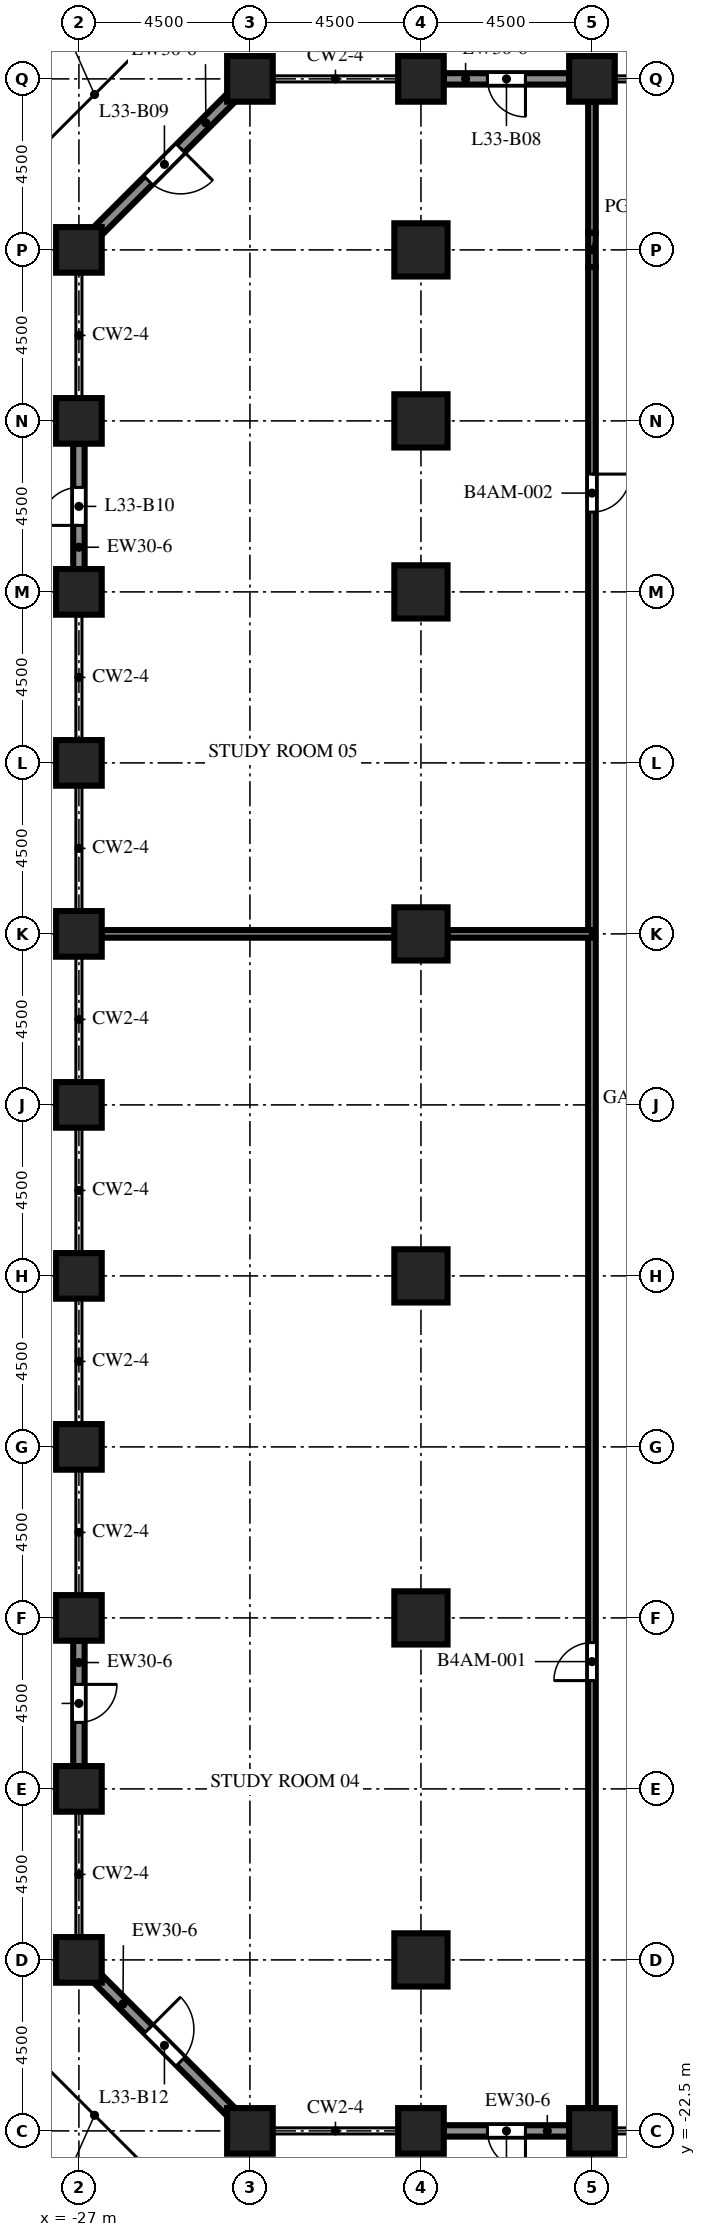
"""IFC4 building model, lengths in metres.
Left out: names, types, materials, properties, quantities, classifications, styles, units other than length and angle.
Written with IfcOpenShell. Run it as: python <this file> out.ifc"""

import sys

from ifc_helpers import new_model, si_unit, direction, frame, frame_2d, origin, origin_2d, place, context, subcontext, project, spatial, rectangle, extrude, element, fill, save


model = new_model("IFC4")
c1 = context("Model", 3, precision=1e-05, world=origin(), true_north=direction((0.0, 1.0)))
c2 = subcontext(c1, "Body", "Model", "MODEL_VIEW")
j1 = project(units=[si_unit("LENGTHUNIT", "METRE"), si_unit("PLANEANGLEUNIT", "RADIAN")], contexts=[c1])
p1 = place(None, origin())
s1 = spatial("IfcSite", under=j1, at=p1, CompositionType="ELEMENT")
p2 = place(p1, origin())
s2 = spatial("IfcBuilding", under=s1, at=p2, CompositionType="ELEMENT")
p3 = place(p2, frame((0.0, 0.0, 145.4)))
s3 = spatial("IfcBuildingStorey", under=s2, at=p3, CompositionType="ELEMENT", Elevation=145.4)
for number, where, z_axis, x_axis in (
    (1, (-27.0, -18.0, 0.0), (0.0, 0.0, 1.0), (1.0, 0.0, 0.0)),
    (2, (-27.0, -13.5, 0.0), (0.0, 0.0, 1.0), (1.0, 0.0, 0.0)),
    (3, (-27.0, -9.0, 0.0), (0.0, 0.0, 1.0), (1.0, 0.0, 0.0)),
    (4, (-27.0, -4.5, 0.0), (0.0, 0.0, 1.0), (1.0, 0.0, 0.0)),
    (5, (-27.0, 0.0, 0.0), (0.0, 0.0, 1.0), (1.0, 0.0, 0.0)),
    (6, (-27.0, 4.5, 0.0), (0.0, 0.0, 1.0), (1.0, 0.0, 0.0)),
    (7, (-27.0, 9.0, 0.0), (0.0, 0.0, 1.0), (1.0, 0.0, 0.0)),
    (8, (-27.0, 13.5, 0.0), (0.0, 0.0, 1.0), (1.0, 0.0, 0.0)),
    (9, (-27.0, 18.0, 0.0), (0.0, 0.0, 1.0), (1.0, 0.0, 0.0)),
    (10, (-27.0, 22.5, 0.0), (0.0, 0.0, 1.0), (1.0, 0.0, 0.0)),
):
    element("IfcColumn", number, at=place(p3, frame(where, z_axis=z_axis, x_axis=x_axis)), inside=s3, PredefinedType="COLUMN", context=c2, shape_type="SweptSolid", body=[
        extrude(rectangle(XDim=1.2, YDim=1.2, at=origin_2d()), origin(), (0.0, 0.0, 1.0), 6.0),
    ])
p4 = place(p3, frame((-27.0, 27.0, 0.0), z_axis=(0.0, 0.0, 1.0), x_axis=(1.0, 0.0, 0.0)))
e11 = element("IfcColumn", 11, at=p4, inside=s3, PredefinedType="COLUMN", context=c2, shape_type="SweptSolid", body=[
    extrude(rectangle(XDim=1.2, YDim=1.2, at=origin_2d()), origin(), (0.0, 0.0, 1.0), 3.6),
])
for number, where, z_axis, x_axis in (
    (12, (-22.5, -22.5, 0.0), (0.0, 0.0, 1.0), (1.0, 0.0, 0.0)),
    (13, (-22.5, 31.5, 0.0), (0.0, 0.0, 1.0), (1.0, 0.0, 0.0)),
    (14, (-18.0, -22.5, 0.0), (0.0, 0.0, 1.0), (1.0, 0.0, 0.0)),
    (15, (-18.0, 31.5, 0.0), (0.0, 0.0, 1.0), (1.0, 0.0, 0.0)),
    (16, (-13.5, -22.5, 0.0), (0.0, 0.0, 1.0), (1.0, 0.0, 0.0)),
    (17, (-13.5, 31.5, 0.0), (0.0, 0.0, 1.0), (1.0, 0.0, 0.0)),
):
    element("IfcColumn", number, at=place(p3, frame(where, z_axis=z_axis, x_axis=x_axis)), inside=s3, PredefinedType="COLUMN", context=c2, shape_type="SweptSolid", body=[
        extrude(rectangle(XDim=1.2, YDim=1.2, at=origin_2d()), origin(), (0.0, 0.0, 1.0), 6.0),
    ])
for number, where, z_axis, x_axis in (
    (18, (-18.0, -18.0, 0.0), (0.0, 0.0, 1.0), (1.0, 0.0, 0.0)),
    (19, (-18.0, -9.0, 0.0), (0.0, 0.0, 1.0), (1.0, 0.0, 0.0)),
    (20, (-18.0, 0.0, 0.0), (0.0, 0.0, 1.0), (1.0, 0.0, 0.0)),
    (21, (-18.0, 9.0, 0.0), (0.0, 0.0, 1.0), (1.0, 0.0, 0.0)),
    (22, (-18.0, 18.0, 0.0), (0.0, 0.0, 1.0), (1.0, 0.0, 0.0)),
    (23, (-18.0, 22.5, 0.0), (0.0, 0.0, 1.0), (1.0, 0.0, 0.0)),
):
    element("IfcColumn", number, at=place(p3, frame(where, z_axis=z_axis, x_axis=x_axis)), inside=s3, PredefinedType="COLUMN", context=c2, shape_type="SweptSolid", body=[
        extrude(rectangle(XDim=1.4, YDim=1.4, at=origin_2d()), origin(), (0.0, 0.0, 1.0), 6.0),
    ])
p5 = place(p3, frame((-18.0, 27.0, 0.0), z_axis=(0.0, 0.0, 1.0), x_axis=(1.0, 0.0, 0.0)))
e24 = element("IfcColumn", 24, at=p5, inside=s3, PredefinedType="COLUMN", context=c2, shape_type="SweptSolid", body=[
    extrude(rectangle(XDim=1.4, YDim=1.4, at=origin_2d()), origin(), (0.0, 0.0, 1.0), 5.4),
])
p6 = place(p3, frame((-14.1, -22.5, 0.0), z_axis=(0.0, 0.0, 1.0), x_axis=(-1.0, 0.0, 0.0)))
e25 = element("IfcWall", 25, at=p6, inside=s3, PredefinedType="SOLIDWALL", context=c2, shape_type="SweptSolid", body=[
    extrude(rectangle(XDim=3.3, YDim=0.3, at=frame_2d((1.65, 0.0))), origin(), (0.0, 0.0, 1.0), 4.5),
])
p7 = place(p6, frame((1.15, 0.0, 0.0)))
e26 = element("IfcOpeningElement", 26, at=p7, cuts=e25, PredefinedType="OPENING", context=c2, shape_type="SweptSolid", body=[
    extrude(rectangle(XDim=1.0, YDim=2.2, at=frame_2d((0.5, 1.1))), frame((0.0, 0.16, 0.0), z_axis=(0.0, -1.0, 0.0), x_axis=(1.0, 0.0, 0.0)), (0.0, 0.0, 1.0), 0.32),
])
p8 = place(p3, frame((-17.4, 31.5, 0.0), z_axis=(0.0, 0.0, 1.0), x_axis=(1.0, 0.0, 0.0)))
e27 = element("IfcWall", 27, at=p8, inside=s3, PredefinedType="SOLIDWALL", context=c2, shape_type="SweptSolid", body=[
    extrude(rectangle(XDim=3.3, YDim=0.3, at=frame_2d((1.65, 0.0))), origin(), (0.0, 0.0, 1.0), 4.5),
])
p9 = place(p8, frame((1.15, 0.0, 0.0)))
e28 = element("IfcOpeningElement", 28, at=p9, cuts=e27, PredefinedType="OPENING", context=c2, shape_type="SweptSolid", body=[
    extrude(rectangle(XDim=1.0, YDim=2.2, at=frame_2d((0.5, 1.1))), frame((0.0, 0.16, 0.0), z_axis=(0.0, -1.0, 0.0), x_axis=(1.0, 0.0, 0.0)), (0.0, 0.0, 1.0), 0.32),
])
p10 = place(p3, frame((-26.506, 27.494, 0.0), z_axis=(0.0, 0.0, 1.0), x_axis=(0.707106781187, 0.707106781187, 0.0)))
e29 = element("IfcWall", 29, at=p10, inside=s3, PredefinedType="SOLIDWALL", context=c2, shape_type="SweptSolid", body=[
    extrude(rectangle(XDim=4.967, YDim=0.3, at=frame_2d((2.483, 0.0))), origin(), (0.0, 0.0, 1.0), 4.5),
])
p11 = place(p10, frame((1.884, 0.0, 0.0)))
e30 = element("IfcOpeningElement", 30, at=p11, cuts=e29, PredefinedType="OPENING", context=c2, shape_type="SweptSolid", body=[
    extrude(rectangle(XDim=1.2, YDim=2.2, at=frame_2d((0.6, 1.1))), frame((0.0, 0.16, 0.0), z_axis=(0.0, -1.0, 0.0), x_axis=(1.0, 0.0, 0.0)), (0.0, 0.0, 1.0), 0.32),
])
p12 = place(p3, frame((-27.0, 18.6, 0.0), z_axis=(0.0, 0.0, 1.0), x_axis=(0.0, 1.0, 0.0)))
e31 = element("IfcWall", 31, at=p12, inside=s3, PredefinedType="SOLIDWALL", context=c2, shape_type="SweptSolid", body=[
    extrude(rectangle(XDim=3.3, YDim=0.3, at=frame_2d((1.65, 0.0))), origin(), (0.0, 0.0, 1.0), 4.5),
])
p13 = place(p12, frame((1.15, 0.0, 0.0)))
e32 = element("IfcOpeningElement", 32, at=p13, cuts=e31, PredefinedType="OPENING", context=c2, shape_type="SweptSolid", body=[
    extrude(rectangle(XDim=1.0, YDim=2.2, at=frame_2d((0.5, 1.1))), frame((0.0, 0.16, 0.0), z_axis=(0.0, -1.0, 0.0), x_axis=(1.0, 0.0, 0.0)), (0.0, 0.0, 1.0), 0.32),
])
p14 = place(p3, frame((-27.0, -12.9, 0.0), z_axis=(0.0, 0.0, 1.0), x_axis=(0.0, 1.0, 0.0)))
e33 = element("IfcWall", 33, at=p14, inside=s3, PredefinedType="SOLIDWALL", context=c2, shape_type="SweptSolid", body=[
    extrude(rectangle(XDim=3.3, YDim=0.3, at=frame_2d((1.65, 0.0))), origin(), (0.0, 0.0, 1.0), 4.5),
])
p15 = place(p14, frame((1.15, 0.0, 0.0)))
e34 = element("IfcOpeningElement", 34, at=p15, cuts=e33, PredefinedType="OPENING", context=c2, shape_type="SweptSolid", body=[
    extrude(rectangle(XDim=1.0, YDim=2.2, at=frame_2d((0.5, 1.1))), frame((0.0, 0.16, 0.0), z_axis=(0.0, -1.0, 0.0), x_axis=(1.0, 0.0, 0.0)), (0.0, 0.0, 1.0), 0.32),
])
p16 = place(p3, frame((-22.994, -22.006, 0.0), z_axis=(0.0, 0.0, 1.0), x_axis=(-0.707106781187, 0.707106781187, 0.0)))
e35 = element("IfcWall", 35, at=p16, inside=s3, PredefinedType="SOLIDWALL", context=c2, shape_type="SweptSolid", body=[
    extrude(rectangle(XDim=4.967, YDim=0.3, at=frame_2d((2.483, 0.0))), origin(), (0.0, 0.0, 1.0), 4.5),
])
p17 = place(p16, frame((1.884, 0.0, 0.0)))
e36 = element("IfcOpeningElement", 36, at=p17, cuts=e35, PredefinedType="OPENING", context=c2, shape_type="SweptSolid", body=[
    extrude(rectangle(XDim=1.2, YDim=2.2, at=frame_2d((0.6, 1.1))), frame((0.0, 0.16, 0.0), z_axis=(0.0, -1.0, 0.0), x_axis=(1.0, 0.0, 0.0)), (0.0, 0.0, 1.0), 0.32),
])
p18 = place(p3, frame((-13.5, -21.9, 0.0), z_axis=(0.0, 0.0, 1.0), x_axis=(0.0, 1.0, 0.0)))
e37 = element("IfcWall", 37, at=p18, inside=s3, PredefinedType="PARTITIONING", context=c2, shape_type="SweptSolid", body=[
    extrude(rectangle(XDim=48.45, YDim=0.2, at=frame_2d((24.225, 0.0))), origin(), (0.0, 0.0, 1.0), 5.4),
])
p19 = place(p18, frame((11.25, 0.0, 0.0)))
e38 = element("IfcOpeningElement", 38, at=p19, cuts=e37, PredefinedType="OPENING", context=c2, shape_type="SweptSolid", body=[
    extrude(rectangle(XDim=1.0, YDim=2.1, at=frame_2d((0.5, 1.05))), frame((0.0, 0.11, 0.0), z_axis=(0.0, -1.0, 0.0), x_axis=(1.0, 0.0, 0.0)), (0.0, 0.0, 1.0), 0.22),
])
p20 = place(p18, frame((42.0, 0.0, 0.0)))
e39 = element("IfcOpeningElement", 39, at=p20, cuts=e37, PredefinedType="OPENING", context=c2, shape_type="SweptSolid", body=[
    extrude(rectangle(XDim=1.0, YDim=2.1, at=frame_2d((0.5, 1.05))), frame((0.0, 0.11, 0.0), z_axis=(0.0, -1.0, 0.0), x_axis=(1.0, 0.0, 0.0)), (0.0, 0.0, 1.0), 0.22),
])
p21 = place(p3, frame((-13.5, 26.55, 0.0), z_axis=(0.0, 0.0, 1.0), x_axis=(0.0, 1.0, 0.0)))
e40 = element("IfcWall", 40, at=p21, inside=s3, PredefinedType="PARTITIONING", context=c2, shape_type="SweptSolid", body=[
    extrude(rectangle(XDim=0.9, YDim=0.2, at=frame_2d((0.45, 0.0))), origin(), (0.0, 0.0, 1.0), 3.57),
])
p22 = place(p3, frame((-13.5, 27.45, 0.0), z_axis=(0.0, 0.0, 1.0), x_axis=(0.0, 1.0, 0.0)))
e41 = element("IfcWall", 41, at=p22, inside=s3, PredefinedType="PARTITIONING", context=c2, shape_type="SweptSolid", body=[
    extrude(rectangle(XDim=3.45, YDim=0.2, at=frame_2d((1.725, 0.0))), origin(), (0.0, 0.0, 1.0), 5.4),
])
p23 = place(p3, frame((-26.4, 9.0, 0.0), z_axis=(0.0, 0.0, 1.0), x_axis=(1.0, 0.0, 0.0)))
e42 = element("IfcWall", 42, at=p23, inside=s3, PredefinedType="PARTITIONING", context=c2, shape_type="SweptSolid", body=[
    extrude(rectangle(XDim=7.7, YDim=0.2, at=frame_2d((3.85, 0.0))), origin(), (0.0, 0.0, 1.0), 5.4),
])
p24 = place(p3, frame((-17.3, 9.0, 0.0), z_axis=(0.0, 0.0, 1.0), x_axis=(1.0, 0.0, 0.0)))
e43 = element("IfcWall", 43, at=p24, inside=s3, PredefinedType="PARTITIONING", context=c2, shape_type="SweptSolid", body=[
    extrude(rectangle(XDim=3.8, YDim=0.2, at=frame_2d((1.9, 0.0))), origin(), (0.0, 0.0, 1.0), 5.4),
])
p25 = place(p7, origin())
e44 = element("IfcDoor", 44, at=p25, inside=s3, OperationType="SINGLE_SWING_LEFT", PredefinedType="DOOR", context=c2, shape_type="SweptSolid", body=[
    extrude(rectangle(XDim=1.0, YDim=2.2, at=frame_2d((0.5, 1.1))), frame((0.0, 0.025, 0.0), z_axis=(0.0, -1.0, 0.0), x_axis=(1.0, 0.0, 0.0)), (0.0, 0.0, 1.0), 0.05),
])
fill(e26, e44)
p26 = place(p9, origin())
e45 = element("IfcDoor", 45, at=p26, inside=s3, OperationType="SINGLE_SWING_RIGHT", PredefinedType="DOOR", context=c2, shape_type="SweptSolid", body=[
    extrude(rectangle(XDim=1.0, YDim=2.2, at=frame_2d((0.5, 1.1))), frame((0.0, 0.025, 0.0), z_axis=(0.0, -1.0, 0.0), x_axis=(1.0, 0.0, 0.0)), (0.0, 0.0, 1.0), 0.05),
])
fill(e28, e45)
p27 = place(p11, origin())
e46 = element("IfcDoor", 46, at=p27, inside=s3, OperationType="SINGLE_SWING_RIGHT", PredefinedType="DOOR", context=c2, shape_type="SweptSolid", body=[
    extrude(rectangle(XDim=1.2, YDim=2.2, at=frame_2d((0.6, 1.1))), frame((0.0, 0.025, 0.0), z_axis=(0.0, -1.0, 0.0), x_axis=(1.0, 0.0, 0.0)), (0.0, 0.0, 1.0), 0.05),
])
fill(e30, e46)
p28 = place(p13, origin())
e47 = element("IfcDoor", 47, at=p28, inside=s3, OperationType="SINGLE_SWING_LEFT", PredefinedType="DOOR", context=c2, shape_type="SweptSolid", body=[
    extrude(rectangle(XDim=1.0, YDim=2.2, at=frame_2d((0.5, 1.1))), frame((0.0, 0.025, 0.0), z_axis=(0.0, -1.0, 0.0), x_axis=(1.0, 0.0, 0.0)), (0.0, 0.0, 1.0), 0.05),
])
fill(e32, e47)
p29 = place(p15, origin())
e48 = element("IfcDoor", 48, at=p29, inside=s3, OperationType="SINGLE_SWING_RIGHT", PredefinedType="DOOR", context=c2, shape_type="SweptSolid", body=[
    extrude(rectangle(XDim=1.0, YDim=2.2, at=frame_2d((0.5, 1.1))), frame((0.0, 0.025, 0.0), z_axis=(0.0, -1.0, 0.0), x_axis=(1.0, 0.0, 0.0)), (0.0, 0.0, 1.0), 0.05),
])
fill(e34, e48)
p30 = place(p17, origin())
e49 = element("IfcDoor", 49, at=p30, inside=s3, OperationType="SINGLE_SWING_RIGHT", PredefinedType="DOOR", context=c2, shape_type="SweptSolid", body=[
    extrude(rectangle(XDim=1.2, YDim=2.2, at=frame_2d((0.6, 1.1))), frame((0.0, 0.025, 0.0), z_axis=(0.0, -1.0, 0.0), x_axis=(1.0, 0.0, 0.0)), (0.0, 0.0, 1.0), 0.05),
])
fill(e36, e49)
p31 = place(p19, origin())
e50 = element("IfcDoor", 50, at=p31, inside=s3, OperationType="SINGLE_SWING_LEFT", PredefinedType="DOOR", context=c2, shape_type="SweptSolid", body=[
    extrude(rectangle(XDim=1.0, YDim=2.1, at=frame_2d((0.5, 1.05))), frame((0.0, 0.025, 0.0), z_axis=(0.0, -1.0, 0.0), x_axis=(1.0, 0.0, 0.0)), (0.0, 0.0, 1.0), 0.05),
])
fill(e38, e50)
p32 = place(p20, origin())
e51 = element("IfcDoor", 51, at=p32, inside=s3, OperationType="SINGLE_SWING_RIGHT", PredefinedType="DOOR", context=c2, shape_type="SweptSolid", body=[
    extrude(rectangle(XDim=1.0, YDim=2.1, at=frame_2d((0.5, 1.05))), frame((0.0, 0.025, 0.0), z_axis=(0.0, -1.0, 0.0), x_axis=(1.0, 0.0, 0.0)), (0.0, 0.0, 1.0), 0.05),
])
fill(e39, e51)
save(model, sys.argv[1])
